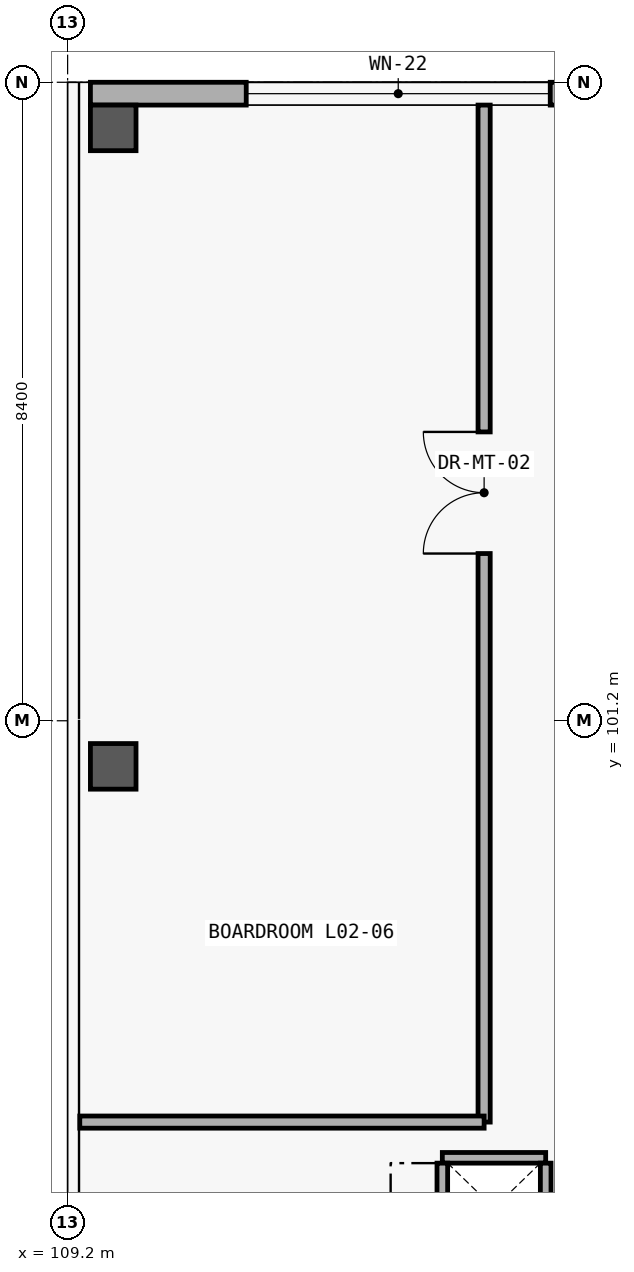
"""IFC4 building model, lengths in metres.
Left out: names, types, materials, properties, quantities, classifications, styles, units other than length and angle.
Written with IfcOpenShell. Run it as: python <this file> out.ifc"""

import sys

from ifc_helpers import new_model, si_unit, direction, frame, frame_2d, origin, origin_2d, place, context, subcontext, project, spatial, rectangle, extrude, element, fill, save


model = new_model("IFC4")
c1 = context("Model", 3, precision=1e-05, world=origin(), true_north=direction((0.0, 1.0)))
c2 = subcontext(c1, "Body", "Model", "MODEL_VIEW")
j1 = project(units=[si_unit("LENGTHUNIT", "METRE"), si_unit("PLANEANGLEUNIT", "RADIAN")], contexts=[c1])
p1 = place(None, origin())
s1 = spatial("IfcSite", under=j1, at=p1, CompositionType="ELEMENT")
p2 = place(p1, origin())
s2 = spatial("IfcBuilding", under=s1, at=p2, CompositionType="ELEMENT")
p3 = place(p2, frame((0.0, 0.0, 10.8)))
s3 = spatial("IfcBuildingStorey", under=s2, at=p3, CompositionType="ELEMENT", Elevation=10.8)
for number, where, z_axis, x_axis in (
    (1, (109.8, 100.6, 0.0), (0.0, 0.0, 1.0), (1.0, 0.0, 0.0)),
    (2, (109.8, 109.0, 0.0), (0.0, 0.0, 1.0), (1.0, 0.0, 0.0)),
):
    element("IfcColumn", number, at=place(p3, frame(where, z_axis=z_axis, x_axis=x_axis)), inside=s3, PredefinedType="COLUMN", context=c2, shape_type="SweptSolid", body=[
        extrude(rectangle(XDim=0.6, YDim=0.6, at=origin_2d()), origin(), (0.0, 0.0, 1.0), 4.2),
    ])
p4 = place(p3, frame((109.5, 109.45, 0.0), z_axis=(0.0, 0.0, 1.0), x_axis=(1.0, 0.0, 0.0)))
e3 = element("IfcWall", 3, at=p4, inside=s3, PredefinedType="SOLIDWALL", context=c2, shape_type="SweptSolid", body=[
    extrude(rectangle(XDim=8.1, YDim=0.3, at=frame_2d((4.05, 0.0))), origin(), (0.0, 0.0, 1.0), 3.92),
])
p5 = place(p4, frame((2.05, 0.0, 0.9)))
e4 = element("IfcOpeningElement", 4, at=p5, cuts=e3, PredefinedType="OPENING", context=c2, shape_type="SweptSolid", body=[
    extrude(rectangle(XDim=4.0, YDim=2.4, at=frame_2d((2.0, 1.2))), frame((0.0, 0.16, 0.0), z_axis=(0.0, -1.0, 0.0), x_axis=(1.0, 0.0, 0.0)), (0.0, 0.0, 1.0), 0.32),
])
p6 = place(p3, frame((114.68, 95.92, 0.0), z_axis=(0.0, 0.0, 1.0), x_axis=(0.0, 1.0, 0.0)))
e5 = element("IfcWall", 5, at=p6, inside=s3, PredefinedType="PARTITIONING", context=c2, shape_type="SweptSolid", body=[
    extrude(rectangle(XDim=13.38, YDim=0.16, at=frame_2d((6.69, 0.0))), origin(), (0.0, 0.0, 1.0), 3.02),
])
p7 = place(p6, frame((7.48, 0.0, 0.0)))
e6 = element("IfcOpeningElement", 6, at=p7, cuts=e5, PredefinedType="OPENING", context=c2, shape_type="SweptSolid", body=[
    extrude(rectangle(XDim=1.6, YDim=2.3, at=frame_2d((0.8, 1.15))), frame((0.0, 0.09, 0.0), z_axis=(0.0, -1.0, 0.0), x_axis=(1.0, 0.0, 0.0)), (0.0, 0.0, 1.0), 0.18),
])
p8 = place(p3, frame((109.36, 95.92, 0.0), z_axis=(0.0, 0.0, 1.0), x_axis=(1.0, 0.0, 0.0)))
e7 = element("IfcWall", 7, at=p8, inside=s3, PredefinedType="PARTITIONING", context=c2, shape_type="SweptSolid", body=[
    extrude(rectangle(XDim=5.32, YDim=0.16, at=frame_2d((2.66, 0.0))), origin(), (0.0, 0.0, 1.0), 3.02),
])
p9 = place(p3, frame((115.49, 95.45, 0.0), z_axis=(0.0, 0.0, 1.0), x_axis=(-1.0, 0.0, 0.0)))
e8 = element("IfcWall", 8, at=p9, inside=s3, PredefinedType="PARTITIONING", context=c2, shape_type="SweptSolid", body=[
    extrude(rectangle(XDim=1.36, YDim=0.14, at=frame_2d((0.68, 0.0))), origin(), (0.0, 0.0, 1.0), 3.04),
])
for number, where, z_axis, x_axis in (
    (9, (114.13, 95.38, 0.0), (0.0, 0.0, 1.0), (0.0, -1.0, 0.0)),
    (10, (115.49, 94.2, 0.0), (0.0, 0.0, 1.0), (0.0, 1.0, 0.0)),
):
    element("IfcWall", number, at=place(p3, frame(where, z_axis=z_axis, x_axis=x_axis)), inside=s3, PredefinedType="PARTITIONING", context=c2, shape_type="SweptSolid", body=[
        extrude(rectangle(XDim=1.18, YDim=0.14, at=frame_2d((0.59, 0.0))), origin(), (0.0, 0.0, 1.0), 3.04),
    ])
p10 = place(p5, origin())
e11 = element("IfcWindow", 11, at=p10, inside=s3, PartitioningType="SINGLE_PANEL", PredefinedType="WINDOW", context=c2, shape_type="SweptSolid", body=[
    extrude(rectangle(XDim=4.0, YDim=2.4, at=frame_2d((2.0, 1.2))), frame((0.0, 0.03, 0.0), z_axis=(0.0, -1.0, 0.0), x_axis=(1.0, 0.0, 0.0)), (0.0, 0.0, 1.0), 0.06),
])
fill(e4, e11)
p11 = place(p7, origin())
e12 = element("IfcDoor", 12, at=p11, inside=s3, OperationType="DOUBLE_DOOR_SINGLE_SWING", PredefinedType="DOOR", context=c2, shape_type="SweptSolid", body=[
    extrude(rectangle(XDim=1.6, YDim=2.3, at=frame_2d((0.8, 1.15))), frame((0.0, 0.025, 0.0), z_axis=(0.0, -1.0, 0.0), x_axis=(1.0, 0.0, 0.0)), (0.0, 0.0, 1.0), 0.05),
])
fill(e6, e12)
save(model, sys.argv[1])
